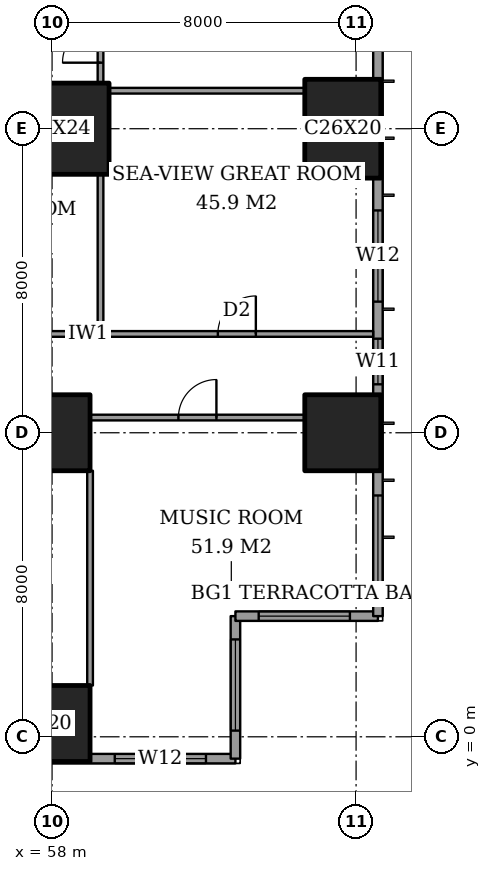
"""IFC4 building model, lengths in metres.
Left out: names, types, materials, properties, quantities, classifications, styles, units other than length and angle.
Written with IfcOpenShell. Run it as: python <this file> out.ifc"""

import sys

from ifc_helpers import new_model, si_unit, direction, frame, frame_2d, origin, origin_2d, place, context, subcontext, project, spatial, rectangle, extrude, element, fill, save


model = new_model("IFC4")
c1 = context("Model", 3, precision=1e-05, world=origin(), true_north=direction((0.0, 1.0)))
c2 = subcontext(c1, "Body", "Model", "MODEL_VIEW")
j1 = project(units=[si_unit("LENGTHUNIT", "METRE"), si_unit("PLANEANGLEUNIT", "RADIAN")], contexts=[c1])
p1 = place(None, origin())
s1 = spatial("IfcSite", under=j1, at=p1, CompositionType="ELEMENT")
p2 = place(p1, origin())
s2 = spatial("IfcBuilding", under=s1, at=p2, CompositionType="ELEMENT")
p3 = place(p2, frame((0.0, 0.0, 135.8)))
s3 = spatial("IfcBuildingStorey", under=s2, at=p3, CompositionType="ELEMENT", Elevation=135.8)
for number, where, z_axis, x_axis in (
    (1, (58.0, 0.35, 0.0), (0.0, 0.0, 1.0), (1.0, 0.0, 0.0)),
    (2, (58.0, 8.0, 0.0), (0.0, 0.0, 1.0), (1.0, 0.0, 0.0)),
):
    element("IfcColumn", number, at=place(p3, frame(where, z_axis=z_axis, x_axis=x_axis)), inside=s3, PredefinedType="COLUMN", context=c2, shape_type="SweptSolid", body=[
        extrude(rectangle(XDim=2.0, YDim=2.0, at=origin_2d()), origin(), (0.0, 0.0, 1.0), 3.6),
    ])
p4 = place(p3, frame((58.0, 16.0, 0.0), z_axis=(0.0, 0.0, 1.0), x_axis=(1.0, 0.0, 0.0)))
e3 = element("IfcColumn", 3, at=p4, inside=s3, PredefinedType="COLUMN", context=c2, shape_type="SweptSolid", body=[
    extrude(rectangle(XDim=3.0, YDim=2.4, at=origin_2d()), origin(), (0.0, 0.0, 1.0), 3.6),
])
p5 = place(p3, frame((65.65, 8.0, 0.0), z_axis=(0.0, 0.0, 1.0), x_axis=(1.0, 0.0, 0.0)))
e4 = element("IfcColumn", 4, at=p5, inside=s3, PredefinedType="COLUMN", context=c2, shape_type="SweptSolid", body=[
    extrude(rectangle(XDim=2.0, YDim=2.0, at=origin_2d()), origin(), (0.0, 0.0, 1.0), 3.6),
])
p6 = place(p3, frame((65.65, 16.0, 0.0), z_axis=(0.0, 0.0, 1.0), x_axis=(0.0, 1.0, 0.0)))
e5 = element("IfcColumn", 5, at=p6, inside=s3, PredefinedType="COLUMN", context=c2, shape_type="SweptSolid", body=[
    extrude(rectangle(XDim=2.6, YDim=2.0, at=origin_2d()), origin(), (0.0, 0.0, 1.0), 3.6),
])
p7 = place(p3, frame((41.425, -0.575, 0.0), z_axis=(0.0, 0.0, 1.0), x_axis=(1.0, 0.0, 0.0)))
e6 = element("IfcWall", 6, at=p7, inside=s3, PredefinedType="SOLIDWALL", context=c2, shape_type="SweptSolid", body=[
    extrude(rectangle(XDim=21.4, YDim=0.25, at=frame_2d((10.7, 0.0))), origin(), (0.0, 0.0, 1.0), 3.6),
])
p8 = place(p7, frame((3.05, 0.0, 0.4)))
e7 = element("IfcOpeningElement", 7, at=p8, cuts=e6, PredefinedType="OPENING", context=c2, shape_type="SweptSolid", body=[
    extrude(rectangle(XDim=2.4, YDim=2.2, at=frame_2d((1.2, 1.1))), frame((0.0, 0.135, 0.0), z_axis=(0.0, -1.0, 0.0), x_axis=(1.0, 0.0, 0.0)), (0.0, 0.0, 1.0), 0.27),
])
p9 = place(p7, frame((6.85, 0.0, 0.4)))
e8 = element("IfcOpeningElement", 8, at=p9, cuts=e6, PredefinedType="OPENING", context=c2, shape_type="SweptSolid", body=[
    extrude(rectangle(XDim=0.6, YDim=2.2, at=frame_2d((0.3, 1.1))), frame((0.0, 0.135, 0.0), z_axis=(0.0, -1.0, 0.0), x_axis=(1.0, 0.0, 0.0)), (0.0, 0.0, 1.0), 0.27),
])
p10 = place(p7, frame((9.975, 0.0, 0.4)))
e9 = element("IfcOpeningElement", 9, at=p10, cuts=e6, PredefinedType="OPENING", context=c2, shape_type="SweptSolid", body=[
    extrude(rectangle(XDim=1.2, YDim=2.2, at=frame_2d((0.6, 1.1))), frame((0.0, 0.135, 0.0), z_axis=(0.0, -1.0, 0.0), x_axis=(1.0, 0.0, 0.0)), (0.0, 0.0, 1.0), 0.27),
])
p11 = place(p7, frame((12.375, 0.0, 0.4)))
e10 = element("IfcOpeningElement", 10, at=p11, cuts=e6, PredefinedType="OPENING", context=c2, shape_type="SweptSolid", body=[
    extrude(rectangle(XDim=2.4, YDim=2.2, at=frame_2d((1.2, 1.1))), frame((0.0, 0.135, 0.0), z_axis=(0.0, -1.0, 0.0), x_axis=(1.0, 0.0, 0.0)), (0.0, 0.0, 1.0), 0.27),
])
p12 = place(p7, frame((18.225, 0.0, 0.4)))
e11 = element("IfcOpeningElement", 11, at=p12, cuts=e6, PredefinedType="OPENING", context=c2, shape_type="SweptSolid", body=[
    extrude(rectangle(XDim=2.4, YDim=2.2, at=frame_2d((1.2, 1.1))), frame((0.0, 0.135, 0.0), z_axis=(0.0, -1.0, 0.0), x_axis=(1.0, 0.0, 0.0)), (0.0, 0.0, 1.0), 0.27),
])
p13 = place(p3, frame((62.825, -0.575, 0.0), z_axis=(0.0, 0.0, 1.0), x_axis=(0.0, 1.0, 0.0)))
e12 = element("IfcWall", 12, at=p13, inside=s3, PredefinedType="SOLIDWALL", context=c2, shape_type="SweptSolid", body=[
    extrude(rectangle(XDim=3.75, YDim=0.25, at=frame_2d((1.875, 0.0))), origin(), (0.0, 0.0, 1.0), 3.6),
])
p14 = place(p13, frame((0.738, 0.0, 0.4)))
e13 = element("IfcOpeningElement", 13, at=p14, cuts=e12, PredefinedType="OPENING", context=c2, shape_type="SweptSolid", body=[
    extrude(rectangle(XDim=2.4, YDim=2.2, at=frame_2d((1.2, 1.1))), frame((0.0, 0.135, 0.0), z_axis=(0.0, -1.0, 0.0), x_axis=(1.0, 0.0, 0.0)), (0.0, 0.0, 1.0), 0.27),
])
p15 = place(p3, frame((62.825, 3.175, 0.0), z_axis=(0.0, 0.0, 1.0), x_axis=(1.0, 0.0, 0.0)))
e14 = element("IfcWall", 14, at=p15, inside=s3, PredefinedType="SOLIDWALL", context=c2, shape_type="SweptSolid", body=[
    extrude(rectangle(XDim=3.75, YDim=0.25, at=frame_2d((1.875, 0.0))), origin(), (0.0, 0.0, 1.0), 3.6),
])
p16 = place(p15, frame((0.613, 0.0, 0.4)))
e15 = element("IfcOpeningElement", 15, at=p16, cuts=e14, PredefinedType="OPENING", context=c2, shape_type="SweptSolid", body=[
    extrude(rectangle(XDim=2.4, YDim=2.2, at=frame_2d((1.2, 1.1))), frame((0.0, 0.135, 0.0), z_axis=(0.0, -1.0, 0.0), x_axis=(1.0, 0.0, 0.0)), (0.0, 0.0, 1.0), 0.27),
])
p17 = place(p3, frame((66.575, 3.175, 0.0), z_axis=(0.0, 0.0, 1.0), x_axis=(0.0, 1.0, 0.0)))
e16 = element("IfcWall", 16, at=p17, inside=s3, PredefinedType="SOLIDWALL", context=c2, shape_type="SweptSolid", body=[
    extrude(rectangle(XDim=41.65, YDim=0.25, at=frame_2d((20.825, 0.0))), origin(), (0.0, 0.0, 1.0), 3.6),
])
p18 = place(p17, frame((0.775, 0.0, 0.4)))
e17 = element("IfcOpeningElement", 17, at=p18, cuts=e16, PredefinedType="OPENING", context=c2, shape_type="SweptSolid", body=[
    extrude(rectangle(XDim=2.4, YDim=2.2, at=frame_2d((1.2, 1.1))), frame((0.0, 0.135, 0.0), z_axis=(0.0, -1.0, 0.0), x_axis=(1.0, 0.0, 0.0)), (0.0, 0.0, 1.0), 0.27),
])
p19 = place(p17, frame((6.1, 0.0, 0.4)))
e18 = element("IfcOpeningElement", 18, at=p19, cuts=e16, PredefinedType="OPENING", context=c2, shape_type="SweptSolid", body=[
    extrude(rectangle(XDim=1.2, YDim=2.2, at=frame_2d((0.6, 1.1))), frame((0.0, 0.135, 0.0), z_axis=(0.0, -1.0, 0.0), x_axis=(1.0, 0.0, 0.0)), (0.0, 0.0, 1.0), 0.27),
])
p20 = place(p17, frame((8.275, 0.0, 0.4)))
e19 = element("IfcOpeningElement", 19, at=p20, cuts=e16, PredefinedType="OPENING", context=c2, shape_type="SweptSolid", body=[
    extrude(rectangle(XDim=2.4, YDim=2.2, at=frame_2d((1.2, 1.1))), frame((0.0, 0.135, 0.0), z_axis=(0.0, -1.0, 0.0), x_axis=(1.0, 0.0, 0.0)), (0.0, 0.0, 1.0), 0.27),
])
p21 = place(p17, frame((15.775, 0.0, 0.4)))
e20 = element("IfcOpeningElement", 20, at=p21, cuts=e16, PredefinedType="OPENING", context=c2, shape_type="SweptSolid", body=[
    extrude(rectangle(XDim=2.4, YDim=2.2, at=frame_2d((1.2, 1.1))), frame((0.0, 0.135, 0.0), z_axis=(0.0, -1.0, 0.0), x_axis=(1.0, 0.0, 0.0)), (0.0, 0.0, 1.0), 0.27),
])
p22 = place(p17, frame((23.475, 0.0, 0.4)))
e21 = element("IfcOpeningElement", 21, at=p22, cuts=e16, PredefinedType="OPENING", context=c2, shape_type="SweptSolid", body=[
    extrude(rectangle(XDim=2.4, YDim=2.2, at=frame_2d((1.2, 1.1))), frame((0.0, 0.135, 0.0), z_axis=(0.0, -1.0, 0.0), x_axis=(1.0, 0.0, 0.0)), (0.0, 0.0, 1.0), 0.27),
])
p23 = place(p17, frame((30.975, 0.0, 0.4)))
e22 = element("IfcOpeningElement", 22, at=p23, cuts=e16, PredefinedType="OPENING", context=c2, shape_type="SweptSolid", body=[
    extrude(rectangle(XDim=2.4, YDim=2.2, at=frame_2d((1.2, 1.1))), frame((0.0, 0.135, 0.0), z_axis=(0.0, -1.0, 0.0), x_axis=(1.0, 0.0, 0.0)), (0.0, 0.0, 1.0), 0.27),
])
p24 = place(p17, frame((34.5, 0.0, 0.4)))
e23 = element("IfcOpeningElement", 23, at=p24, cuts=e16, PredefinedType="OPENING", context=c2, shape_type="SweptSolid", body=[
    extrude(rectangle(XDim=1.2, YDim=2.2, at=frame_2d((0.6, 1.1))), frame((0.0, 0.135, 0.0), z_axis=(0.0, -1.0, 0.0), x_axis=(1.0, 0.0, 0.0)), (0.0, 0.0, 1.0), 0.27),
])
p25 = place(p17, frame((38.475, 0.0, 0.4)))
e24 = element("IfcOpeningElement", 24, at=p25, cuts=e16, PredefinedType="OPENING", context=c2, shape_type="SweptSolid", body=[
    extrude(rectangle(XDim=2.4, YDim=2.2, at=frame_2d((1.2, 1.1))), frame((0.0, 0.135, 0.0), z_axis=(0.0, -1.0, 0.0), x_axis=(1.0, 0.0, 0.0)), (0.0, 0.0, 1.0), 0.27),
])
p26 = place(p3, frame((59.0, 8.4, 0.0), z_axis=(0.0, 0.0, 1.0), x_axis=(1.0, 0.0, 0.0)))
e25 = element("IfcWall", 25, at=p26, inside=s3, PredefinedType="PARTITIONING", context=c2, shape_type="SweptSolid", body=[
    extrude(rectangle(XDim=5.65, YDim=0.15, at=frame_2d((2.825, 0.0))), origin(), (0.0, 0.0, 1.0), 3.35),
])
p27 = place(p26, frame((2.325, 0.0, 0.0)))
e26 = element("IfcOpeningElement", 26, at=p27, cuts=e25, PredefinedType="OPENING", context=c2, shape_type="SweptSolid", body=[
    extrude(rectangle(XDim=1.0, YDim=2.1, at=frame_2d((0.5, 1.05))), frame((0.0, 0.085, 0.0), z_axis=(0.0, -1.0, 0.0), x_axis=(1.0, 0.0, 0.0)), (0.0, 0.0, 1.0), 0.17),
])
p28 = place(p3, frame((41.439, 10.6, 0.0), z_axis=(0.0, 0.0, 1.0), x_axis=(1.0, 0.0, 0.0)))
e27 = element("IfcWall", 27, at=p28, inside=s3, PredefinedType="PARTITIONING", context=c2, shape_type="SweptSolid", body=[
    extrude(rectangle(XDim=25.011, YDim=0.15, at=frame_2d((12.505, 0.0))), origin(), (0.0, 0.0, 1.0), 3.35),
])
p29 = place(p28, frame((11.961, 0.0, 0.0)))
e28 = element("IfcOpeningElement", 28, at=p29, cuts=e27, PredefinedType="OPENING", context=c2, shape_type="SweptSolid", body=[
    extrude(rectangle(XDim=1.0, YDim=2.1, at=frame_2d((0.5, 1.05))), frame((0.0, 0.085, 0.0), z_axis=(0.0, -1.0, 0.0), x_axis=(1.0, 0.0, 0.0)), (0.0, 0.0, 1.0), 0.17),
])
p30 = place(p28, frame((20.924, 0.0, 0.0)))
e29 = element("IfcOpeningElement", 29, at=p30, cuts=e27, PredefinedType="OPENING", context=c2, shape_type="SweptSolid", body=[
    extrude(rectangle(XDim=1.0, YDim=2.1, at=frame_2d((0.5, 1.05))), frame((0.0, 0.085, 0.0), z_axis=(0.0, -1.0, 0.0), x_axis=(1.0, 0.0, 0.0)), (0.0, 0.0, 1.0), 0.17),
])
p31 = place(p28, frame((15.249, 0.0, 0.0)))
e30 = element("IfcOpeningElement", 30, at=p31, cuts=e27, PredefinedType="OPENING", context=c2, shape_type="SweptSolid", body=[
    extrude(rectangle(XDim=0.9, YDim=2.1, at=frame_2d((0.45, 1.05))), frame((0.0, 0.085, 0.0), z_axis=(0.0, -1.0, 0.0), x_axis=(1.0, 0.0, 0.0)), (0.0, 0.0, 1.0), 0.17),
])
p32 = place(p28, frame((9.661, 0.0, 0.0)))
e31 = element("IfcOpeningElement", 31, at=p32, cuts=e27, PredefinedType="OPENING", context=c2, shape_type="SweptSolid", body=[
    extrude(rectangle(XDim=1.0, YDim=2.1, at=frame_2d((0.5, 1.05))), frame((0.0, 0.085, 0.0), z_axis=(0.0, -1.0, 0.0), x_axis=(1.0, 0.0, 0.0)), (0.0, 0.0, 1.0), 0.17),
])
p33 = place(p28, frame((7.311, 0.0, 0.0)))
e32 = element("IfcOpeningElement", 32, at=p33, cuts=e27, PredefinedType="OPENING", context=c2, shape_type="SweptSolid", body=[
    extrude(rectangle(XDim=0.9, YDim=2.1, at=frame_2d((0.45, 1.05))), frame((0.0, 0.085, 0.0), z_axis=(0.0, -1.0, 0.0), x_axis=(1.0, 0.0, 0.0)), (0.0, 0.0, 1.0), 0.17),
])
p34 = place(p28, frame((2.836, 0.0, 0.0)))
e33 = element("IfcOpeningElement", 33, at=p34, cuts=e27, PredefinedType="OPENING", context=c2, shape_type="SweptSolid", body=[
    extrude(rectangle(XDim=1.0, YDim=2.1, at=frame_2d((0.5, 1.05))), frame((0.0, 0.085, 0.0), z_axis=(0.0, -1.0, 0.0), x_axis=(1.0, 0.0, 0.0)), (0.0, 0.0, 1.0), 0.17),
])
p35 = place(p3, frame((59.5, 17.0, 0.0), z_axis=(0.0, 0.0, 1.0), x_axis=(1.0, 0.0, 0.0)))
e34 = element("IfcWall", 34, at=p35, inside=s3, PredefinedType="PARTITIONING", context=c2, shape_type="SweptSolid", body=[
    extrude(rectangle(XDim=5.15, YDim=0.15, at=frame_2d((2.575, 0.0))), origin(), (0.0, 0.0, 1.0), 3.35),
])
p36 = place(p3, frame((59.0, 1.35, 0.0), z_axis=(0.0, 0.0, 1.0), x_axis=(0.0, 1.0, 0.0)))
e35 = element("IfcWall", 35, at=p36, inside=s3, PredefinedType="PARTITIONING", context=c2, shape_type="SweptSolid", body=[
    extrude(rectangle(XDim=5.65, YDim=0.15, at=frame_2d((2.825, 0.0))), origin(), (0.0, 0.0, 1.0), 3.35),
])
p37 = place(p3, frame((59.275, 10.6, 0.0), z_axis=(0.0, 0.0, 1.0), x_axis=(0.0, 1.0, 0.0)))
e36 = element("IfcWall", 36, at=p37, inside=s3, PredefinedType="PARTITIONING", context=c2, shape_type="SweptSolid", body=[
    extrude(rectangle(XDim=4.2, YDim=0.15, at=frame_2d((2.1, 0.0))), origin(), (0.0, 0.0, 1.0), 3.35),
])
p38 = place(p3, frame((59.275, 17.2, 0.0), z_axis=(0.0, 0.0, 1.0), x_axis=(0.0, 1.0, 0.0)))
e37 = element("IfcWall", 37, at=p38, inside=s3, PredefinedType="PARTITIONING", context=c2, shape_type="SweptSolid", body=[
    extrude(rectangle(XDim=2.45, YDim=0.15, at=frame_2d((1.225, 0.0))), origin(), (0.0, 0.0, 1.0), 3.35),
])
p39 = place(p38, frame((0.538, 0.0, 0.0)))
e38 = element("IfcOpeningElement", 38, at=p39, cuts=e37, PredefinedType="OPENING", context=c2, shape_type="SweptSolid", body=[
    extrude(rectangle(XDim=1.0, YDim=2.1, at=frame_2d((0.5, 1.05))), frame((0.0, 0.085, 0.0), z_axis=(0.0, -1.0, 0.0), x_axis=(1.0, 0.0, 0.0)), (0.0, 0.0, 1.0), 0.17),
])
p40 = place(p12, origin())
e39 = element("IfcWindow", 39, at=p40, inside=s3, PartitioningType="SINGLE_PANEL", PredefinedType="WINDOW", context=c2, shape_type="SweptSolid", body=[
    extrude(rectangle(XDim=2.4, YDim=2.2, at=frame_2d((1.2, 1.1))), frame((0.0, 0.03, 0.0), z_axis=(0.0, -1.0, 0.0), x_axis=(1.0, 0.0, 0.0)), (0.0, 0.0, 1.0), 0.06),
])
fill(e11, e39)
p41 = place(p14, origin())
e40 = element("IfcWindow", 40, at=p41, inside=s3, PartitioningType="SINGLE_PANEL", PredefinedType="WINDOW", context=c2, shape_type="SweptSolid", body=[
    extrude(rectangle(XDim=2.4, YDim=2.2, at=frame_2d((1.2, 1.1))), frame((0.0, 0.03, 0.0), z_axis=(0.0, -1.0, 0.0), x_axis=(1.0, 0.0, 0.0)), (0.0, 0.0, 1.0), 0.06),
])
fill(e13, e40)
p42 = place(p16, origin())
e41 = element("IfcWindow", 41, at=p42, inside=s3, PartitioningType="SINGLE_PANEL", PredefinedType="WINDOW", context=c2, shape_type="SweptSolid", body=[
    extrude(rectangle(XDim=2.4, YDim=2.2, at=frame_2d((1.2, 1.1))), frame((0.0, 0.03, 0.0), z_axis=(0.0, -1.0, 0.0), x_axis=(1.0, 0.0, 0.0)), (0.0, 0.0, 1.0), 0.06),
])
fill(e15, e41)
p43 = place(p18, origin())
e42 = element("IfcWindow", 42, at=p43, inside=s3, PartitioningType="SINGLE_PANEL", PredefinedType="WINDOW", context=c2, shape_type="SweptSolid", body=[
    extrude(rectangle(XDim=2.4, YDim=2.2, at=frame_2d((1.2, 1.1))), frame((0.0, 0.03, 0.0), z_axis=(0.0, -1.0, 0.0), x_axis=(1.0, 0.0, 0.0)), (0.0, 0.0, 1.0), 0.06),
])
fill(e17, e42)
p44 = place(p19, origin())
e43 = element("IfcWindow", 43, at=p44, inside=s3, PartitioningType="SINGLE_PANEL", PredefinedType="WINDOW", context=c2, shape_type="SweptSolid", body=[
    extrude(rectangle(XDim=1.2, YDim=2.2, at=frame_2d((0.6, 1.1))), frame((0.0, 0.03, 0.0), z_axis=(0.0, -1.0, 0.0), x_axis=(1.0, 0.0, 0.0)), (0.0, 0.0, 1.0), 0.06),
])
fill(e18, e43)
p45 = place(p20, origin())
e44 = element("IfcWindow", 44, at=p45, inside=s3, PartitioningType="SINGLE_PANEL", PredefinedType="WINDOW", context=c2, shape_type="SweptSolid", body=[
    extrude(rectangle(XDim=2.4, YDim=2.2, at=frame_2d((1.2, 1.1))), frame((0.0, 0.03, 0.0), z_axis=(0.0, -1.0, 0.0), x_axis=(1.0, 0.0, 0.0)), (0.0, 0.0, 1.0), 0.06),
])
fill(e19, e44)
p46 = place(p27, origin())
e45 = element("IfcDoor", 45, at=p46, inside=s3, OperationType="SINGLE_SWING_LEFT", PredefinedType="DOOR", context=c2, shape_type="SweptSolid", body=[
    extrude(rectangle(XDim=1.0, YDim=2.1, at=frame_2d((0.5, 1.05))), frame((0.0, 0.025, 0.0), z_axis=(0.0, -1.0, 0.0), x_axis=(1.0, 0.0, 0.0)), (0.0, 0.0, 1.0), 0.05),
])
fill(e26, e45)
p47 = place(p30, origin())
e46 = element("IfcDoor", 46, at=p47, inside=s3, OperationType="SINGLE_SWING_LEFT", PredefinedType="DOOR", context=c2, shape_type="SweptSolid", body=[
    extrude(rectangle(XDim=1.0, YDim=2.1, at=frame_2d((0.5, 1.05))), frame((0.0, 0.025, 0.0), z_axis=(0.0, -1.0, 0.0), x_axis=(1.0, 0.0, 0.0)), (0.0, 0.0, 1.0), 0.05),
])
fill(e29, e46)
p48 = place(p39, origin())
e47 = element("IfcDoor", 47, at=p48, inside=s3, OperationType="SINGLE_SWING_RIGHT", PredefinedType="DOOR", context=c2, shape_type="SweptSolid", body=[
    extrude(rectangle(XDim=1.0, YDim=2.1, at=frame_2d((0.5, 1.05))), frame((0.0, 0.025, 0.0), z_axis=(0.0, -1.0, 0.0), x_axis=(1.0, 0.0, 0.0)), (0.0, 0.0, 1.0), 0.05),
])
fill(e38, e47)
save(model, sys.argv[1])
